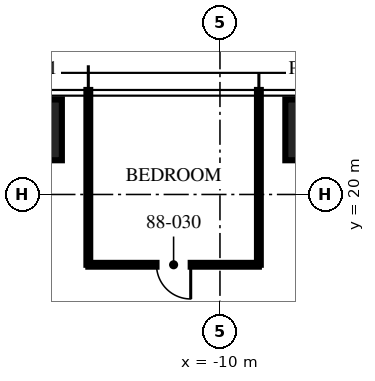
"""IFC4 building model, lengths in metres.
Left out: names, types, materials, properties, quantities, classifications, styles, units other than length and angle.
Written with IfcOpenShell. Run it as: python <this file> out.ifc"""

import sys

from ifc_helpers import new_model, si_unit, direction, frame, frame_2d, origin, origin_2d, place, context, subcontext, project, spatial, rectangle, extrude, element, fill, save


model = new_model("IFC4")
c1 = context("Model", 3, precision=1e-05, world=origin(), true_north=direction((0.0, 1.0)))
c2 = subcontext(c1, "Body", "Model", "MODEL_VIEW")
j1 = project(units=[si_unit("LENGTHUNIT", "METRE"), si_unit("PLANEANGLEUNIT", "RADIAN")], contexts=[c1])
p1 = place(None, origin())
s1 = spatial("IfcSite", under=j1, at=p1, CompositionType="ELEMENT")
p2 = place(p1, origin())
s2 = spatial("IfcBuilding", under=s1, at=p2, CompositionType="ELEMENT")
p3 = place(p2, frame((0.0, 0.0, 349.5)))
s3 = spatial("IfcBuildingStorey", under=s2, at=p3, CompositionType="ELEMENT", Elevation=349.5)
for number, where, z_axis, x_axis in (
    (1, (-14.96, 21.7, 0.0), (0.0, 0.0, 1.0), (1.0, 0.0, 0.0)),
    (2, (-7.48, 21.7, 0.0), (0.0, 0.0, 1.0), (1.0, 0.0, 0.0)),
):
    element("IfcColumn", number, at=place(p3, frame(where, z_axis=z_axis, x_axis=x_axis)), inside=s3, PredefinedType="COLUMN", context=c2, shape_type="SweptSolid", body=[
        extrude(rectangle(XDim=1.6, YDim=1.6, at=origin_2d()), origin(), (0.0, 0.0, 1.0), 3.75),
    ])
for number, where, z_axis, x_axis in (
    (3, (-8.976, 18.15, 0.0), (0.0, 0.0, 1.0), (0.0, 1.0, 0.0)),
    (4, (-13.464, 18.15, 0.0), (0.0, 0.0, 1.0), (0.0, 1.0, 0.0)),
):
    element("IfcWall", number, at=place(p3, frame(where, z_axis=z_axis, x_axis=x_axis)), inside=s3, PredefinedType="PARTITIONING", context=c2, shape_type="SweptSolid", body=[
        extrude(rectangle(XDim=4.6, YDim=0.1, at=frame_2d((2.3, 0.0))), origin(), (0.0, 0.0, 1.0), 2.85),
    ])
p4 = place(p3, frame((-8.976, 18.15, 0.0), z_axis=(0.0, 0.0, 1.0), x_axis=(-1.0, 0.0, 0.0)))
e5 = element("IfcWall", 5, at=p4, inside=s3, PredefinedType="PARTITIONING", context=c2, shape_type="SweptSolid", body=[
    extrude(rectangle(XDim=4.488, YDim=0.1, at=frame_2d((2.244, 0.0))), origin(), (0.0, 0.0, 1.0), 2.56),
])
p5 = place(p4, frame((1.794, 0.0, 0.0)))
e6 = element("IfcOpeningElement", 6, at=p5, cuts=e5, PredefinedType="OPENING", context=c2, shape_type="SweptSolid", body=[
    extrude(rectangle(XDim=0.9, YDim=2.1, at=frame_2d((0.45, 1.05))), frame((0.0, 0.06, 0.0), z_axis=(0.0, -1.0, 0.0), x_axis=(1.0, 0.0, 0.0)), (0.0, 0.0, 1.0), 0.12),
])
p6 = place(p5, origin())
e7 = element("IfcDoor", 7, at=p6, inside=s3, OperationType="SINGLE_SWING_LEFT", PredefinedType="DOOR", context=c2, shape_type="SweptSolid", body=[
    extrude(rectangle(XDim=0.9, YDim=2.1, at=frame_2d((0.45, 1.05))), frame((0.0, 0.025, 0.0), z_axis=(0.0, -1.0, 0.0), x_axis=(1.0, 0.0, 0.0)), (0.0, 0.0, 1.0), 0.05),
])
fill(e6, e7)
save(model, sys.argv[1])
